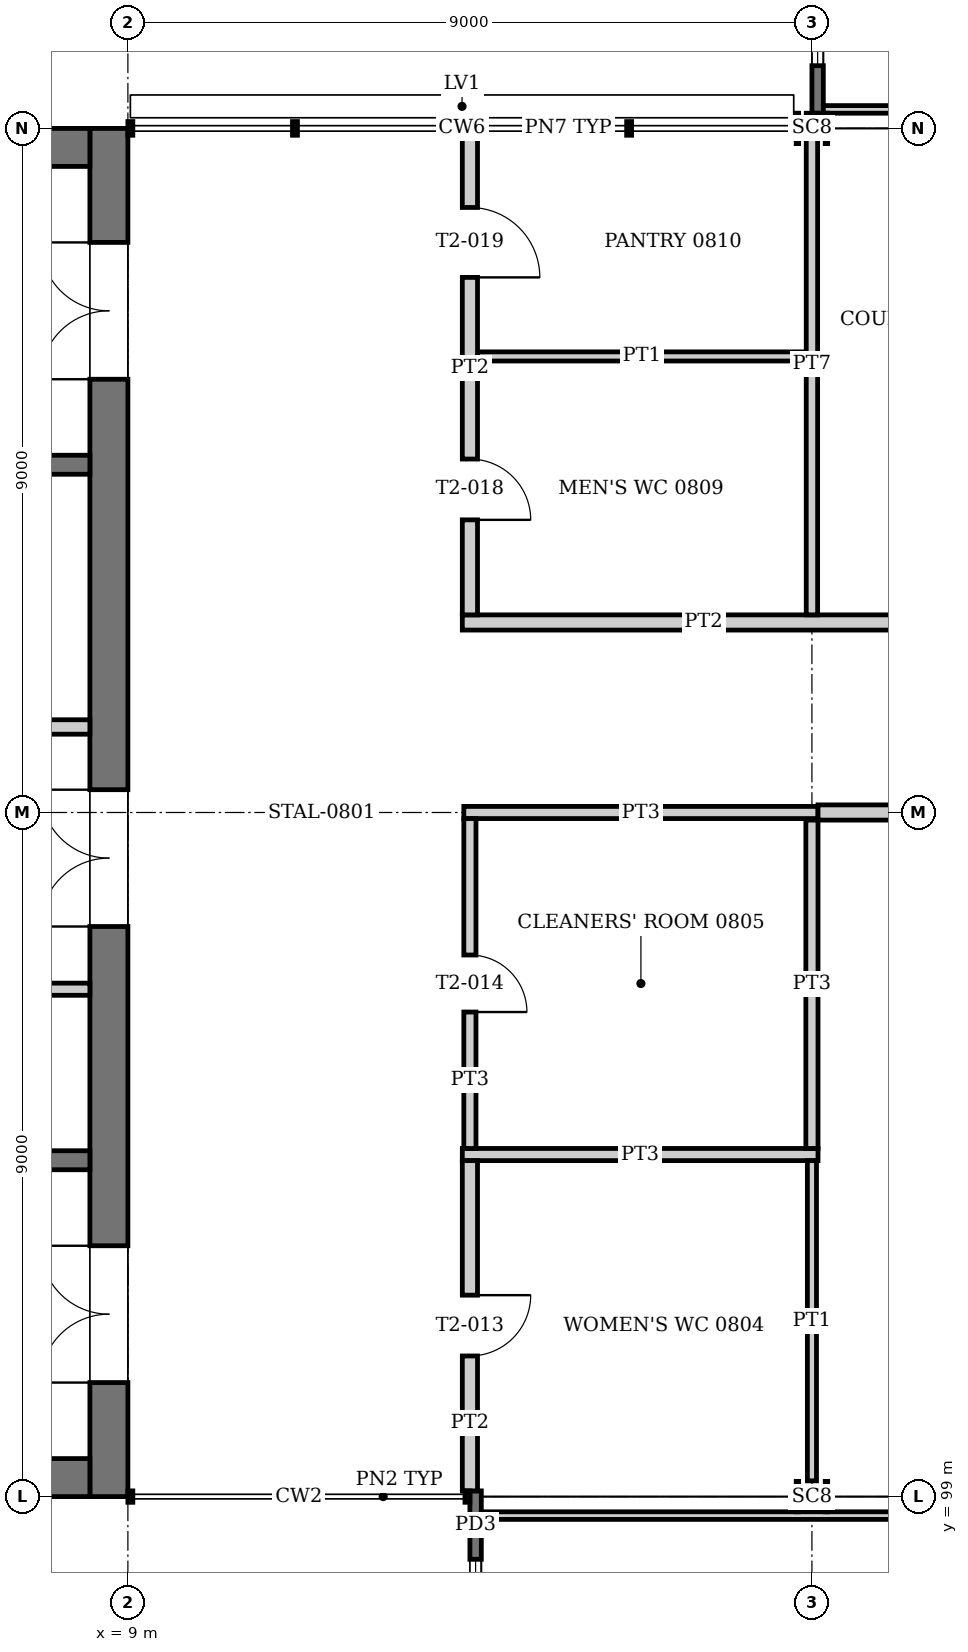
"""IFC4 building model, lengths in metres.
Left out: names, types, materials, properties, quantities, classifications, styles, units other than length and angle.
Written with IfcOpenShell. Run it as: python <this file> out.ifc"""

import sys

from ifc_helpers import new_model, si_unit, direction, frame, frame_2d, origin, origin_2d, place, context, subcontext, project, spatial, rectangle, i_section, extrude, element, fill, save


model = new_model("IFC4")
c1 = context("Model", 3, precision=1e-05, world=origin(), true_north=direction((0.0, 1.0)))
c2 = subcontext(c1, "Body", "Model", "MODEL_VIEW")
j1 = project(units=[si_unit("LENGTHUNIT", "METRE"), si_unit("PLANEANGLEUNIT", "RADIAN")], contexts=[c1])
p1 = place(None, origin())
s1 = spatial("IfcSite", under=j1, at=p1, CompositionType="ELEMENT")
p2 = place(p1, origin())
s2 = spatial("IfcBuilding", under=s1, at=p2, CompositionType="ELEMENT")
p3 = place(p2, frame((0.0, 0.0, 35.2)))
s3 = spatial("IfcBuildingStorey", under=s2, at=p3, CompositionType="ELEMENT", Elevation=35.2)
for number, where, z_axis, x_axis in (
    (1, (18.0, 99.0, 0.0), (0.0, 0.0, 1.0), (0.0, 1.0, 0.0)),
    (2, (18.0, 117.0, 0.0), (0.0, 0.0, 1.0), (0.0, 1.0, 0.0)),
):
    element("IfcColumn", number, at=place(p3, frame(where, z_axis=z_axis, x_axis=x_axis)), inside=s3, PredefinedType="COLUMN", context=c2, shape_type="SweptSolid", body=[
        extrude(i_section(OverallWidth=0.4, OverallDepth=0.414, WebThickness=0.025, FlangeThickness=0.032, at=origin_2d()), origin(), (0.0, 0.0, 1.0), 4.0),
    ])
p4 = place(p3, frame((8.75, 99.0, 0.0), z_axis=(0.0, 0.0, 1.0), x_axis=(0.0, 1.0, 0.0)))
e3 = element("IfcWall", 3, at=p4, inside=s3, PredefinedType="SHEAR", context=c2, shape_type="SweptSolid", body=[
    extrude(rectangle(XDim=18.0, YDim=0.5, at=frame_2d((9.0, 0.0))), origin(), (0.0, 0.0, 1.0), 4.0),
])
p5 = place(p4, frame((1.5, 0.0, 0.0)))
e4 = element("IfcOpeningElement", 4, at=p5, cuts=e3, PredefinedType="OPENING", context=c2, shape_type="SweptSolid", body=[
    extrude(rectangle(XDim=1.8, YDim=2.1, at=frame_2d((0.9, 1.05))), frame((0.0, 0.26, 0.0), z_axis=(0.0, -1.0, 0.0), x_axis=(1.0, 0.0, 0.0)), (0.0, 0.0, 1.0), 0.52),
])
p6 = place(p4, frame((14.7, 0.0, 0.0)))
e5 = element("IfcOpeningElement", 5, at=p6, cuts=e3, PredefinedType="OPENING", context=c2, shape_type="SweptSolid", body=[
    extrude(rectangle(XDim=1.8, YDim=2.1, at=frame_2d((0.9, 1.05))), frame((0.0, 0.26, 0.0), z_axis=(0.0, -1.0, 0.0), x_axis=(1.0, 0.0, 0.0)), (0.0, 0.0, 1.0), 0.52),
])
p7 = place(p4, frame((7.5, 0.0, 0.0)))
e6 = element("IfcOpeningElement", 6, at=p7, cuts=e3, PredefinedType="OPENING", context=c2, shape_type="SweptSolid", body=[
    extrude(rectangle(XDim=1.8, YDim=2.1, at=frame_2d((0.9, 1.05))), frame((0.0, 0.26, 0.0), z_axis=(0.0, -1.0, 0.0), x_axis=(1.0, 0.0, 0.0)), (0.0, 0.0, 1.0), 0.52),
])
for number, where, z_axis, x_axis in (
    (7, (0.5, 99.25, 0.0), (0.0, 0.0, 1.0), (1.0, 0.0, 0.0)),
    (8, (0.5, 116.75, 0.0), (0.0, 0.0, 1.0), (1.0, 0.0, 0.0)),
):
    element("IfcWall", number, at=place(p3, frame(where, z_axis=z_axis, x_axis=x_axis)), inside=s3, PredefinedType="SHEAR", context=c2, shape_type="SweptSolid", body=[
        extrude(rectangle(XDim=8.0, YDim=0.5, at=frame_2d((4.0, 0.0))), origin(), (0.0, 0.0, 1.0), 4.0),
    ])
p8 = place(p3, frame((13.575, 95.55, -0.15), z_axis=(0.0, 0.0, 1.0), x_axis=(0.0, 1.0, 0.0)))
e9 = element("IfcWall", 9, at=p8, inside=s3, PredefinedType="SOLIDWALL", context=c2, shape_type="SweptSolid", body=[
    extrude(rectangle(XDim=3.525, YDim=0.15, at=frame_2d((1.762, 0.0))), origin(), (0.0, 0.0, 1.0), 2.75),
])
p9 = place(p8, frame((0.625, 0.0, 1.05)))
e10 = element("IfcOpeningElement", 10, at=p9, cuts=e9, PredefinedType="OPENING", context=c2, shape_type="SweptSolid", body=[
    extrude(rectangle(XDim=2.0, YDim=1.4, at=frame_2d((1.0, 0.7))), frame((0.0, 0.085, 0.0), z_axis=(0.0, -1.0, 0.0), x_axis=(1.0, 0.0, 0.0)), (0.0, 0.0, 1.0), 0.17),
])
p10 = place(p3, frame((13.65, 98.75, 0.0), z_axis=(0.0, 0.0, 1.0), x_axis=(1.0, 0.0, 0.0)))
e11 = element("IfcWall", 11, at=p10, inside=s3, PredefinedType="PARTITIONING", context=c2, shape_type="SweptSolid", body=[
    extrude(rectangle(XDim=17.7, YDim=0.1, at=frame_2d((8.85, 0.0))), origin(), (0.0, 0.0, 1.0), 2.6),
])
p11 = place(p10, frame((8.35, 0.0, 0.0)))
e12 = element("IfcOpeningElement", 12, at=p11, cuts=e11, PredefinedType="OPENING", context=c2, shape_type="SweptSolid", body=[
    extrude(rectangle(XDim=0.9, YDim=2.1, at=frame_2d((0.45, 1.05))), frame((0.0, 0.06, 0.0), z_axis=(0.0, -1.0, 0.0), x_axis=(1.0, 0.0, 0.0)), (0.0, 0.0, 1.0), 0.12),
])
p12 = place(p3, frame((18.075, 120.45, -0.15), z_axis=(0.0, 0.0, 1.0), x_axis=(0.0, -1.0, 0.0)))
e13 = element("IfcWall", 13, at=p12, inside=s3, PredefinedType="SOLIDWALL", context=c2, shape_type="SweptSolid", body=[
    extrude(rectangle(XDim=3.25, YDim=0.15, at=frame_2d((1.625, 0.0))), origin(), (0.0, 0.0, 1.0), 2.75),
])
p13 = place(p12, frame((0.625, 0.0, 1.05)))
e14 = element("IfcOpeningElement", 14, at=p13, cuts=e13, PredefinedType="OPENING", context=c2, shape_type="SweptSolid", body=[
    extrude(rectangle(XDim=2.0, YDim=1.4, at=frame_2d((1.0, 0.7))), frame((0.0, 0.085, 0.0), z_axis=(0.0, -1.0, 0.0), x_axis=(1.0, 0.0, 0.0)), (0.0, 0.0, 1.0), 0.17),
])
p14 = place(p3, frame((18.15, 117.25, 0.0), z_axis=(0.0, 0.0, 1.0), x_axis=(1.0, 0.0, 0.0)))
e15 = element("IfcWall", 15, at=p14, inside=s3, PredefinedType="PARTITIONING", context=c2, shape_type="SweptSolid", body=[
    extrude(rectangle(XDim=4.2, YDim=0.1, at=frame_2d((2.1, 0.0))), origin(), (0.0, 0.0, 1.0), 2.6),
])
p15 = place(p14, frame((1.6, 0.0, 0.0)))
e16 = element("IfcOpeningElement", 16, at=p15, cuts=e15, PredefinedType="OPENING", context=c2, shape_type="SweptSolid", body=[
    extrude(rectangle(XDim=0.9, YDim=2.1, at=frame_2d((0.45, 1.05))), frame((0.0, 0.06, 0.0), z_axis=(0.0, -1.0, 0.0), x_axis=(1.0, 0.0, 0.0)), (0.0, 0.0, 1.0), 0.12),
])
for number, where, z_axis, x_axis in (
    (17, (8.5, 103.425, 0.0), (0.0, 0.0, 1.0), (-1.0, 0.0, 0.0)),
    (18, (8.5, 112.575, 0.0), (0.0, 0.0, 1.0), (-1.0, 0.0, 0.0)),
):
    element("IfcWall", number, at=place(p3, frame(where, z_axis=z_axis, x_axis=x_axis)), inside=s3, PredefinedType="SOLIDWALL", context=c2, shape_type="SweptSolid", body=[
        extrude(rectangle(XDim=8.0, YDim=0.25, at=frame_2d((4.0, 0.0))), origin(), (0.0, 0.0, 1.0), 3.75),
    ])
p16 = place(p3, frame((8.5, 105.675, 0.0), z_axis=(0.0, 0.0, 1.0), x_axis=(-1.0, 0.0, 0.0)))
e19 = element("IfcWall", 19, at=p16, inside=s3, PredefinedType="PARTITIONING", context=c2, shape_type="SweptSolid", body=[
    extrude(rectangle(XDim=2.6, YDim=0.16, at=frame_2d((1.3, 0.0))), origin(), (0.0, 0.0, 1.0), 3.75),
])
p17 = place(p16, frame((0.7, 0.0, 0.0)))
e20 = element("IfcOpeningElement", 20, at=p17, cuts=e19, PredefinedType="OPENING", context=c2, shape_type="SweptSolid", body=[
    extrude(rectangle(XDim=1.2, YDim=2.1, at=frame_2d((0.6, 1.05))), frame((0.0, 0.09, 0.0), z_axis=(0.0, -1.0, 0.0), x_axis=(1.0, 0.0, 0.0)), (0.0, 0.0, 1.0), 0.18),
])
p18 = place(p3, frame((8.5, 109.125, 0.0), z_axis=(0.0, 0.0, 1.0), x_axis=(-1.0, 0.0, 0.0)))
e21 = element("IfcWall", 21, at=p18, inside=s3, PredefinedType="PARTITIONING", context=c2, shape_type="SweptSolid", body=[
    extrude(rectangle(XDim=2.6, YDim=0.19, at=frame_2d((1.3, 0.0))), origin(), (0.0, 0.0, 1.0), 3.75),
])
p19 = place(p18, frame((0.84, 0.0, 0.0)))
e22 = element("IfcOpeningElement", 22, at=p19, cuts=e21, PredefinedType="OPENING", context=c2, shape_type="SweptSolid", body=[
    extrude(rectangle(XDim=0.92, YDim=2.1, at=frame_2d((0.46, 1.05))), frame((0.0, 0.105, 0.0), z_axis=(0.0, -1.0, 0.0), x_axis=(1.0, 0.0, 0.0)), (0.0, 0.0, 1.0), 0.21),
])
p20 = place(p3, frame((13.4, 103.5, 0.0), z_axis=(0.0, 0.0, 1.0), x_axis=(1.0, 0.0, 0.0)))
e23 = element("IfcWall", 23, at=p20, inside=s3, PredefinedType="PARTITIONING", context=c2, shape_type="SweptSolid", body=[
    extrude(rectangle(XDim=4.68, YDim=0.16, at=frame_2d((2.34, 0.0))), origin(), (0.0, 0.0, 1.0), 3.05),
])
p21 = place(p3, frame((13.42, 108.0, 0.0), z_axis=(0.0, 0.0, 1.0), x_axis=(1.0, 0.0, 0.0)))
e24 = element("IfcWall", 24, at=p21, inside=s3, PredefinedType="PARTITIONING", context=c2, shape_type="SweptSolid", body=[
    extrude(rectangle(XDim=4.66, YDim=0.16, at=frame_2d((2.33, 0.0))), origin(), (0.0, 0.0, 1.0), 3.05),
])
p22 = place(p3, frame((18.08, 108.0, 0.0), z_axis=(0.0, 0.0, 1.0), x_axis=(1.0, 0.0, 0.0)))
e25 = element("IfcWall", 25, at=p22, inside=s3, PredefinedType="PARTITIONING", context=c2, shape_type="SweptSolid", body=[
    extrude(rectangle(XDim=22.52, YDim=0.2, at=frame_2d((11.26, 0.0))), origin(), (0.0, 0.0, 1.0), 3.05),
])
p23 = place(p22, frame((5.77, 0.0, 0.0)))
e26 = element("IfcOpeningElement", 26, at=p23, cuts=e25, PredefinedType="OPENING", context=c2, shape_type="SweptSolid", body=[
    extrude(rectangle(XDim=1.8, YDim=2.1, at=frame_2d((0.9, 1.05))), frame((0.0, 0.11, 0.0), z_axis=(0.0, -1.0, 0.0), x_axis=(1.0, 0.0, 0.0)), (0.0, 0.0, 1.0), 0.22),
])
p24 = place(p22, frame((15.17, 0.0, 0.0)))
e27 = element("IfcOpeningElement", 27, at=p24, cuts=e25, PredefinedType="OPENING", context=c2, shape_type="SweptSolid", body=[
    extrude(rectangle(XDim=1.0, YDim=2.1, at=frame_2d((0.5, 1.05))), frame((0.0, 0.11, 0.0), z_axis=(0.0, -1.0, 0.0), x_axis=(1.0, 0.0, 0.0)), (0.0, 0.0, 1.0), 0.22),
])
p25 = place(p22, frame((19.67, 0.0, 0.0)))
e28 = element("IfcOpeningElement", 28, at=p25, cuts=e25, PredefinedType="OPENING", context=c2, shape_type="SweptSolid", body=[
    extrude(rectangle(XDim=1.0, YDim=2.1, at=frame_2d((0.5, 1.05))), frame((0.0, 0.11, 0.0), z_axis=(0.0, -1.0, 0.0), x_axis=(1.0, 0.0, 0.0)), (0.0, 0.0, 1.0), 0.22),
])
p26 = place(p3, frame((13.4, 110.5, 0.0), z_axis=(0.0, 0.0, 1.0), x_axis=(1.0, 0.0, 0.0)))
e29 = element("IfcWall", 29, at=p26, inside=s3, PredefinedType="PARTITIONING", context=c2, shape_type="SweptSolid", body=[
    extrude(rectangle(XDim=27.2, YDim=0.2, at=frame_2d((13.6, 0.0))), origin(), (0.0, 0.0, 1.0), 3.05),
])
p27 = place(p26, frame((6.35, 0.0, 0.0)))
e30 = element("IfcOpeningElement", 30, at=p27, cuts=e29, PredefinedType="OPENING", context=c2, shape_type="SweptSolid", body=[
    extrude(rectangle(XDim=1.0, YDim=2.1, at=frame_2d((0.5, 1.05))), frame((0.0, 0.11, 0.0), z_axis=(0.0, -1.0, 0.0), x_axis=(1.0, 0.0, 0.0)), (0.0, 0.0, 1.0), 0.22),
])
p28 = place(p26, frame((10.85, 0.0, 0.0)))
e31 = element("IfcOpeningElement", 31, at=p28, cuts=e29, PredefinedType="OPENING", context=c2, shape_type="SweptSolid", body=[
    extrude(rectangle(XDim=1.0, YDim=2.1, at=frame_2d((0.5, 1.05))), frame((0.0, 0.11, 0.0), z_axis=(0.0, -1.0, 0.0), x_axis=(1.0, 0.0, 0.0)), (0.0, 0.0, 1.0), 0.22),
])
p29 = place(p26, frame((15.35, 0.0, 0.0)))
e32 = element("IfcOpeningElement", 32, at=p29, cuts=e29, PredefinedType="OPENING", context=c2, shape_type="SweptSolid", body=[
    extrude(rectangle(XDim=1.0, YDim=2.1, at=frame_2d((0.5, 1.05))), frame((0.0, 0.11, 0.0), z_axis=(0.0, -1.0, 0.0), x_axis=(1.0, 0.0, 0.0)), (0.0, 0.0, 1.0), 0.22),
])
p30 = place(p26, frame((19.85, 0.0, 0.0)))
e33 = element("IfcOpeningElement", 33, at=p30, cuts=e29, PredefinedType="OPENING", context=c2, shape_type="SweptSolid", body=[
    extrude(rectangle(XDim=1.0, YDim=2.1, at=frame_2d((0.5, 1.05))), frame((0.0, 0.11, 0.0), z_axis=(0.0, -1.0, 0.0), x_axis=(1.0, 0.0, 0.0)), (0.0, 0.0, 1.0), 0.22),
])
p31 = place(p26, frame((24.35, 0.0, 0.0)))
e34 = element("IfcOpeningElement", 34, at=p31, cuts=e29, PredefinedType="OPENING", context=c2, shape_type="SweptSolid", body=[
    extrude(rectangle(XDim=1.0, YDim=2.1, at=frame_2d((0.5, 1.05))), frame((0.0, 0.11, 0.0), z_axis=(0.0, -1.0, 0.0), x_axis=(1.0, 0.0, 0.0)), (0.0, 0.0, 1.0), 0.22),
])
p32 = place(p3, frame((13.6, 114.0, 0.0), z_axis=(0.0, 0.0, 1.0), x_axis=(1.0, 0.0, 0.0)))
e35 = element("IfcWall", 35, at=p32, inside=s3, PredefinedType="PARTITIONING", context=c2, shape_type="SweptSolid", body=[
    extrude(rectangle(XDim=4.325, YDim=0.12, at=frame_2d((2.163, 0.0))), origin(), (0.0, 0.0, 1.0), 3.05),
])
p33 = place(p3, frame((13.5, 99.075, 0.0), z_axis=(0.0, 0.0, 1.0), x_axis=(0.0, 1.0, 0.0)))
e36 = element("IfcWall", 36, at=p33, inside=s3, PredefinedType="PARTITIONING", context=c2, shape_type="SweptSolid", body=[
    extrude(rectangle(XDim=4.345, YDim=0.2, at=frame_2d((2.172, 0.0))), origin(), (0.0, 0.0, 1.0), 3.05),
])
p34 = place(p33, frame((1.775, 0.0, 0.0)))
e37 = element("IfcOpeningElement", 37, at=p34, cuts=e36, PredefinedType="OPENING", context=c2, shape_type="SweptSolid", body=[
    extrude(rectangle(XDim=0.8, YDim=2.1, at=frame_2d((0.4, 1.05))), frame((0.0, 0.11, 0.0), z_axis=(0.0, -1.0, 0.0), x_axis=(1.0, 0.0, 0.0)), (0.0, 0.0, 1.0), 0.22),
])
p35 = place(p3, frame((13.5, 103.58, 0.0), z_axis=(0.0, 0.0, 1.0), x_axis=(0.0, 1.0, 0.0)))
e38 = element("IfcWall", 38, at=p35, inside=s3, PredefinedType="PARTITIONING", context=c2, shape_type="SweptSolid", body=[
    extrude(rectangle(XDim=4.34, YDim=0.16, at=frame_2d((2.17, 0.0))), origin(), (0.0, 0.0, 1.0), 3.05),
])
p36 = place(p35, frame((1.795, 0.0, 0.0)))
e39 = element("IfcOpeningElement", 39, at=p36, cuts=e38, PredefinedType="OPENING", context=c2, shape_type="SweptSolid", body=[
    extrude(rectangle(XDim=0.75, YDim=2.1, at=frame_2d((0.375, 1.05))), frame((0.0, 0.09, 0.0), z_axis=(0.0, -1.0, 0.0), x_axis=(1.0, 0.0, 0.0)), (0.0, 0.0, 1.0), 0.18),
])
p37 = place(p3, frame((13.5, 110.6, 0.0), z_axis=(0.0, 0.0, 1.0), x_axis=(0.0, 1.0, 0.0)))
e40 = element("IfcWall", 40, at=p37, inside=s3, PredefinedType="PARTITIONING", context=c2, shape_type="SweptSolid", body=[
    extrude(rectangle(XDim=6.31, YDim=0.2, at=frame_2d((3.155, 0.0))), origin(), (0.0, 0.0, 1.0), 3.05),
])
p38 = place(p37, frame((1.25, 0.0, 0.0)))
e41 = element("IfcOpeningElement", 41, at=p38, cuts=e40, PredefinedType="OPENING", context=c2, shape_type="SweptSolid", body=[
    extrude(rectangle(XDim=0.8, YDim=2.1, at=frame_2d((0.4, 1.05))), frame((0.0, 0.11, 0.0), z_axis=(0.0, -1.0, 0.0), x_axis=(1.0, 0.0, 0.0)), (0.0, 0.0, 1.0), 0.22),
])
p39 = place(p37, frame((4.44, 0.0, 0.0)))
e42 = element("IfcOpeningElement", 42, at=p39, cuts=e40, PredefinedType="OPENING", context=c2, shape_type="SweptSolid", body=[
    extrude(rectangle(XDim=0.92, YDim=2.1, at=frame_2d((0.46, 1.05))), frame((0.0, 0.11, 0.0), z_axis=(0.0, -1.0, 0.0), x_axis=(1.0, 0.0, 0.0)), (0.0, 0.0, 1.0), 0.22),
])
p40 = place(p3, frame((18.0, 99.207, 0.0), z_axis=(0.0, 0.0, 1.0), x_axis=(0.0, 1.0, 0.0)))
e43 = element("IfcWall", 43, at=p40, inside=s3, PredefinedType="PARTITIONING", context=c2, shape_type="SweptSolid", body=[
    extrude(rectangle(XDim=4.213, YDim=0.12, at=frame_2d((2.106, 0.0))), origin(), (0.0, 0.0, 1.0), 3.05),
])
p41 = place(p3, frame((18.0, 103.58, 0.0), z_axis=(0.0, 0.0, 1.0), x_axis=(0.0, 1.0, 0.0)))
e44 = element("IfcWall", 44, at=p41, inside=s3, PredefinedType="PARTITIONING", context=c2, shape_type="SweptSolid", body=[
    extrude(rectangle(XDim=4.32, YDim=0.16, at=frame_2d((2.16, 0.0))), origin(), (0.0, 0.0, 1.0), 3.05),
])
p42 = place(p3, frame((18.0, 110.6, 0.0), z_axis=(0.0, 0.0, 1.0), x_axis=(0.0, 1.0, 0.0)))
e45 = element("IfcWall", 45, at=p42, inside=s3, PredefinedType="PARTITIONING", context=c2, shape_type="SweptSolid", body=[
    extrude(rectangle(XDim=6.6, YDim=0.15, at=frame_2d((3.3, 0.0))), origin(), (0.0, 0.0, 1.0), 3.05),
])
p43 = place(p9, origin())
e46 = element("IfcWindow", 46, at=p43, inside=s3, PartitioningType="SINGLE_PANEL", PredefinedType="WINDOW", context=c2, shape_type="SweptSolid", body=[
    extrude(rectangle(XDim=2.0, YDim=1.4, at=frame_2d((1.0, 0.7))), frame((0.0, 0.03, 0.0), z_axis=(0.0, -1.0, 0.0), x_axis=(1.0, 0.0, 0.0)), (0.0, 0.0, 1.0), 0.06),
])
fill(e10, e46)
p44 = place(p13, origin())
e47 = element("IfcWindow", 47, at=p44, inside=s3, PartitioningType="SINGLE_PANEL", PredefinedType="WINDOW", context=c2, shape_type="SweptSolid", body=[
    extrude(rectangle(XDim=2.0, YDim=1.4, at=frame_2d((1.0, 0.7))), frame((0.0, 0.03, 0.0), z_axis=(0.0, -1.0, 0.0), x_axis=(1.0, 0.0, 0.0)), (0.0, 0.0, 1.0), 0.06),
])
fill(e14, e47)
p45 = place(p34, frame((0.8, 0.0, 0.0), z_axis=(0.0, 0.0, 1.0), x_axis=(-1.0, 0.0, 0.0)))
e48 = element("IfcDoor", 48, at=p45, inside=s3, OperationType="SINGLE_SWING_LEFT", PredefinedType="DOOR", context=c2, shape_type="SweptSolid", body=[
    extrude(rectangle(XDim=0.8, YDim=2.1, at=frame_2d((0.4, 1.05))), frame((0.0, 0.025, 0.0), z_axis=(0.0, -1.0, 0.0), x_axis=(1.0, 0.0, 0.0)), (0.0, 0.0, 1.0), 0.05),
])
fill(e37, e48)
p46 = place(p36, frame((0.75, 0.0, 0.0), z_axis=(0.0, 0.0, 1.0), x_axis=(-1.0, 0.0, 0.0)))
e49 = element("IfcDoor", 49, at=p46, inside=s3, OperationType="SINGLE_SWING_RIGHT", PredefinedType="DOOR", context=c2, shape_type="SweptSolid", body=[
    extrude(rectangle(XDim=0.75, YDim=2.1, at=frame_2d((0.375, 1.05))), frame((0.0, 0.025, 0.0), z_axis=(0.0, -1.0, 0.0), x_axis=(1.0, 0.0, 0.0)), (0.0, 0.0, 1.0), 0.05),
])
fill(e39, e49)
p47 = place(p38, frame((0.8, 0.0, 0.0), z_axis=(0.0, 0.0, 1.0), x_axis=(-1.0, 0.0, 0.0)))
e50 = element("IfcDoor", 50, at=p47, inside=s3, OperationType="SINGLE_SWING_RIGHT", PredefinedType="DOOR", context=c2, shape_type="SweptSolid", body=[
    extrude(rectangle(XDim=0.8, YDim=2.1, at=frame_2d((0.4, 1.05))), frame((0.0, 0.025, 0.0), z_axis=(0.0, -1.0, 0.0), x_axis=(1.0, 0.0, 0.0)), (0.0, 0.0, 1.0), 0.05),
])
fill(e41, e50)
p48 = place(p39, frame((0.92, 0.0, 0.0), z_axis=(0.0, 0.0, 1.0), x_axis=(-1.0, 0.0, 0.0)))
e51 = element("IfcDoor", 51, at=p48, inside=s3, OperationType="SINGLE_SWING_RIGHT", PredefinedType="DOOR", context=c2, shape_type="SweptSolid", body=[
    extrude(rectangle(XDim=0.92, YDim=2.1, at=frame_2d((0.46, 1.05))), frame((0.0, 0.025, 0.0), z_axis=(0.0, -1.0, 0.0), x_axis=(1.0, 0.0, 0.0)), (0.0, 0.0, 1.0), 0.05),
])
fill(e42, e51)
p49 = place(p5, origin())
e52 = element("IfcDoor", 52, at=p49, inside=s3, OperationType="DOUBLE_DOOR_SINGLE_SWING", PredefinedType="DOOR", context=c2, shape_type="SweptSolid", body=[
    extrude(rectangle(XDim=1.8, YDim=2.1, at=frame_2d((0.9, 1.05))), frame((0.0, 0.025, 0.0), z_axis=(0.0, -1.0, 0.0), x_axis=(1.0, 0.0, 0.0)), (0.0, 0.0, 1.0), 0.05),
])
fill(e4, e52)
p50 = place(p6, origin())
e53 = element("IfcDoor", 53, at=p50, inside=s3, OperationType="DOUBLE_DOOR_SINGLE_SWING", PredefinedType="DOOR", context=c2, shape_type="SweptSolid", body=[
    extrude(rectangle(XDim=1.8, YDim=2.1, at=frame_2d((0.9, 1.05))), frame((0.0, 0.025, 0.0), z_axis=(0.0, -1.0, 0.0), x_axis=(1.0, 0.0, 0.0)), (0.0, 0.0, 1.0), 0.05),
])
fill(e5, e53)
p51 = place(p7, origin())
e54 = element("IfcDoor", 54, at=p51, inside=s3, OperationType="DOUBLE_DOOR_SINGLE_SWING", PredefinedType="DOOR", context=c2, shape_type="SweptSolid", body=[
    extrude(rectangle(XDim=1.8, YDim=2.1, at=frame_2d((0.9, 1.05))), frame((0.0, 0.025, 0.0), z_axis=(0.0, -1.0, 0.0), x_axis=(1.0, 0.0, 0.0)), (0.0, 0.0, 1.0), 0.05),
])
fill(e6, e54)
save(model, sys.argv[1])
